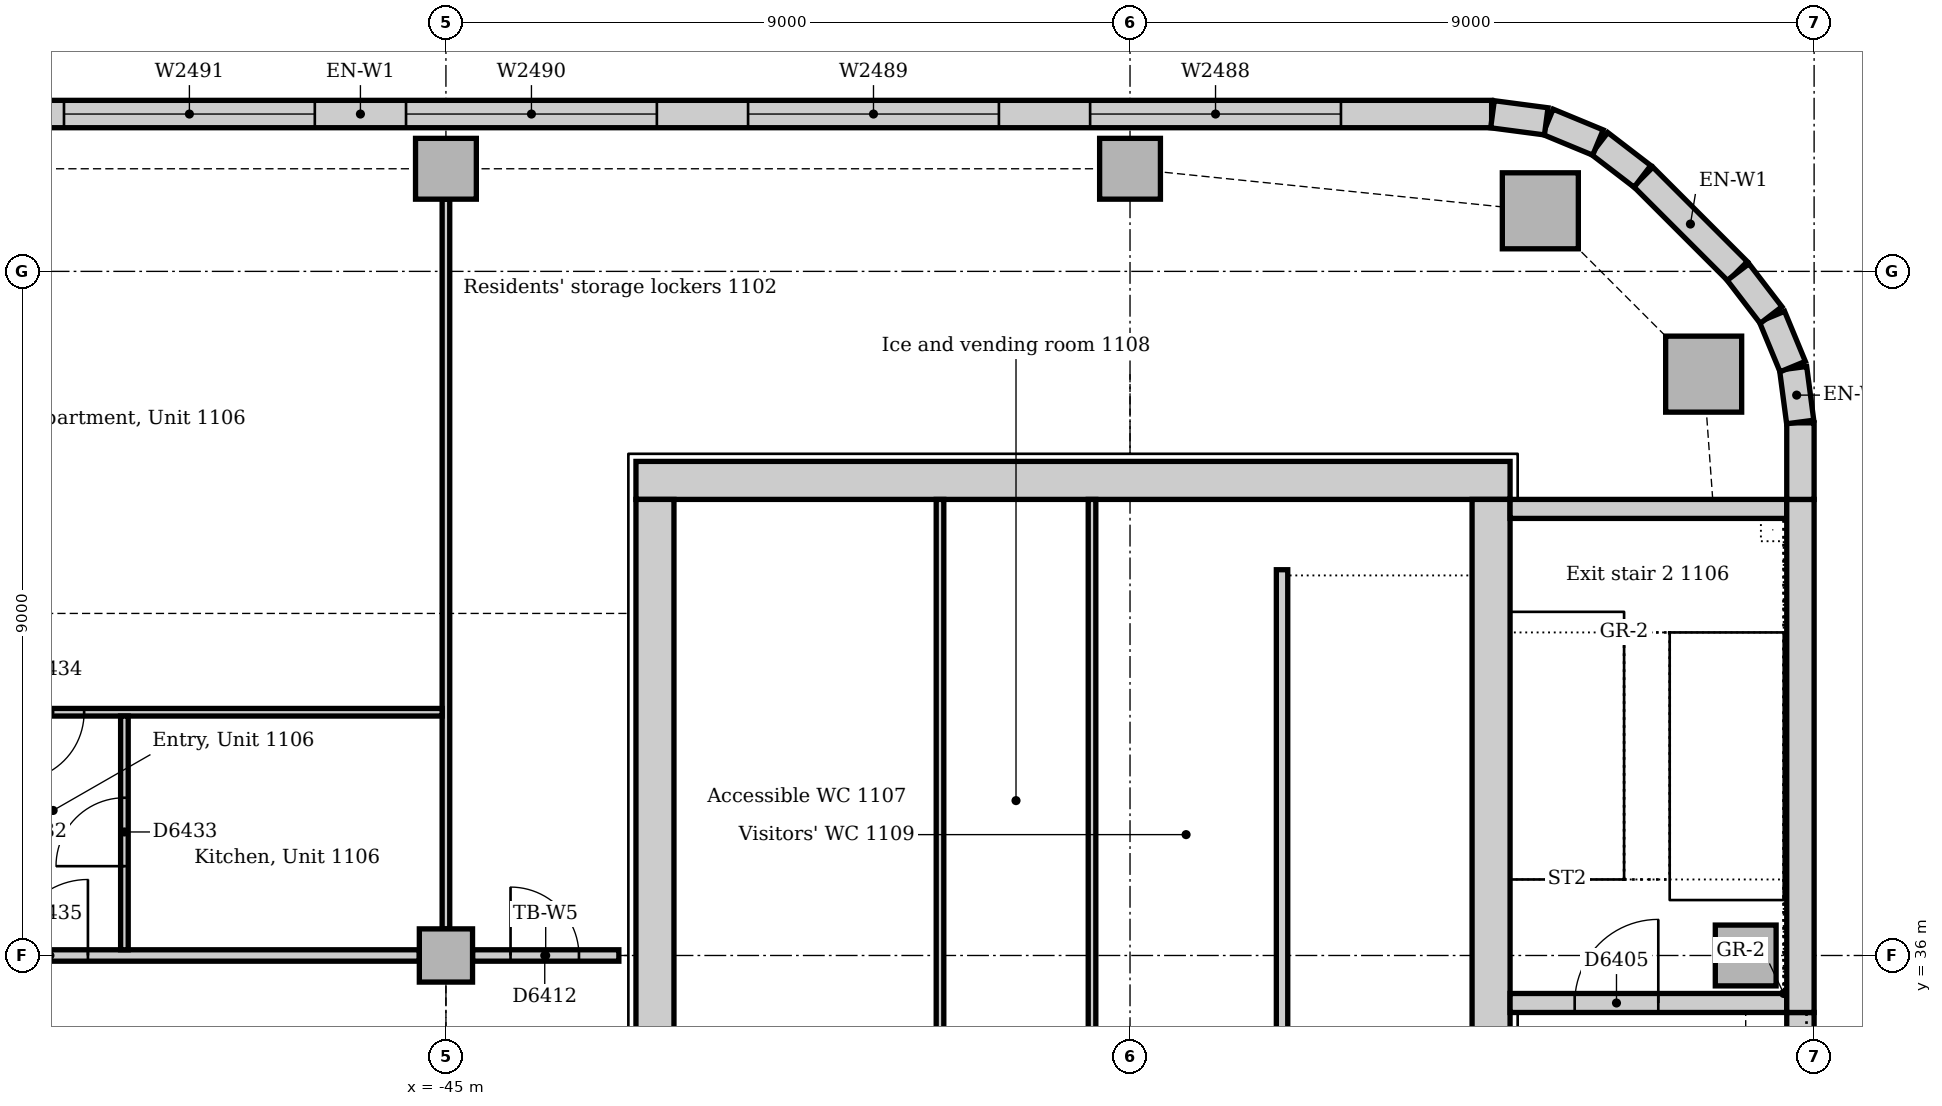
"""IFC4 building model, lengths in metres.
Left out: names, types, materials, properties, quantities, classifications, styles, units other than length and angle.
Written with IfcOpenShell. Run it as: python <this file> out.ifc"""

import sys

from ifc_helpers import new_model, si_unit, direction, frame, frame_2d, origin, origin_2d, place, context, subcontext, project, spatial, rectangle, extrude, element, fill, save


model = new_model("IFC4")
c1 = context("Model", 3, precision=1e-05, world=origin(), true_north=direction((0.0, 1.0)))
c2 = subcontext(c1, "Body", "Model", "MODEL_VIEW")
j1 = project(units=[si_unit("LENGTHUNIT", "METRE"), si_unit("PLANEANGLEUNIT", "RADIAN")], contexts=[c1])
p1 = place(None, origin())
s1 = spatial("IfcSite", under=j1, at=p1, CompositionType="ELEMENT")
p2 = place(p1, origin())
s2 = spatial("IfcBuilding", under=s1, at=p2, CompositionType="ELEMENT")
p3 = place(p2, frame((0.0, 0.0, 51.0)))
s3 = spatial("IfcBuildingStorey", under=s2, at=p3, CompositionType="ELEMENT", Elevation=51.0)
p4 = place(p3, frame((-31.0, 42.25, 0.0), z_axis=(0.0, 0.0, 1.0), x_axis=(-1.0, 0.0, 0.0)))
e1 = element("IfcWall", 1, at=p4, inside=s3, PredefinedType="SOLIDWALL", context=c2, shape_type="SweptSolid", body=[
    extrude(rectangle(XDim=11.5, YDim=0.5, at=frame_2d((5.75, 0.0))), origin(), (0.0, 0.0, 1.0), 4.0),
])
p5 = place(p3, frame((-31.25, 30.5, 0.0), z_axis=(0.0, 0.0, 1.0), x_axis=(0.0, 1.0, 0.0)))
e2 = element("IfcWall", 2, at=p5, inside=s3, PredefinedType="SOLIDWALL", context=c2, shape_type="SweptSolid", body=[
    extrude(rectangle(XDim=11.5, YDim=0.5, at=frame_2d((5.75, 0.0))), origin(), (0.0, 0.0, 1.0), 4.0),
])
p6 = place(p5, frame((0.85, 0.0, 0.0)))
e3 = element("IfcOpeningElement", 3, at=p6, cuts=e2, PredefinedType="OPENING", context=c2, shape_type="SweptSolid", body=[
    extrude(rectangle(XDim=1.8, YDim=2.1, at=frame_2d((0.9, 1.05))), frame((0.0, 0.26, 0.0), z_axis=(0.0, -1.0, 0.0), x_axis=(1.0, 0.0, 0.0)), (0.0, 0.0, 1.0), 0.52),
])
p7 = place(p3, frame((-42.25, 42.0, 0.0), z_axis=(0.0, 0.0, 1.0), x_axis=(0.0, -1.0, 0.0)))
e4 = element("IfcWall", 4, at=p7, inside=s3, PredefinedType="SOLIDWALL", context=c2, shape_type="SweptSolid", body=[
    extrude(rectangle(XDim=11.5, YDim=0.5, at=frame_2d((5.75, 0.0))), origin(), (0.0, 0.0, 1.0), 4.0),
])
p8 = place(p7, frame((8.85, 0.0, 0.0)))
e5 = element("IfcOpeningElement", 5, at=p8, cuts=e4, PredefinedType="OPENING", context=c2, shape_type="SweptSolid", body=[
    extrude(rectangle(XDim=1.8, YDim=2.1, at=frame_2d((0.9, 1.05))), frame((0.0, 0.26, 0.0), z_axis=(0.0, -1.0, 0.0), x_axis=(1.0, 0.0, 0.0)), (0.0, 0.0, 1.0), 0.52),
])
p9 = place(p3, frame((-31.0, 35.375, 0.0), z_axis=(0.0, 0.0, 1.0), x_axis=(1.0, 0.0, 0.0)))
e6 = element("IfcWall", 6, at=p9, inside=s3, PredefinedType="SOLIDWALL", context=c2, shape_type="SweptSolid", body=[
    extrude(rectangle(XDim=3.64, YDim=0.25, at=frame_2d((1.82, 0.0))), origin(), (0.0, 0.0, 1.0), 4.0),
])
p10 = place(p9, frame((0.85, 0.0, 0.0)))
e7 = element("IfcOpeningElement", 7, at=p10, cuts=e6, PredefinedType="OPENING", context=c2, shape_type="SweptSolid", body=[
    extrude(rectangle(XDim=1.1, YDim=2.1, at=frame_2d((0.55, 1.05))), frame((0.0, 0.135, 0.0), z_axis=(0.0, -1.0, 0.0), x_axis=(1.0, 0.0, 0.0)), (0.0, 0.0, 1.0), 0.27),
])
p11 = place(p3, frame((-27.36, 41.875, 0.0), z_axis=(0.0, 0.0, 1.0), x_axis=(-1.0, 0.0, 0.0)))
e8 = element("IfcWall", 8, at=p11, inside=s3, PredefinedType="SOLIDWALL", context=c2, shape_type="SweptSolid", body=[
    extrude(rectangle(XDim=3.64, YDim=0.25, at=frame_2d((1.82, 0.0))), origin(), (0.0, 0.0, 1.0), 4.0),
])
for number, where, z_axis, x_axis in (
    (9, (-28.453, 43.648, -0.15), (0.0, 0.0, 1.0), (1.0, 0.0, 0.0)),
    (10, (-30.602, 45.797, -0.15), (0.0, 0.0, 1.0), (1.0, 0.0, 0.0)),
):
    element("IfcColumn", number, at=place(p3, frame(where, z_axis=z_axis, x_axis=x_axis)), inside=s3, PredefinedType="COLUMN", context=c2, shape_type="SweptSolid", body=[
        extrude(rectangle(XDim=1.0, YDim=1.0, at=origin_2d()), origin(), (0.0, 0.0, 1.0), 4.0),
    ])
for number, where, z_axis, x_axis in (
    (11, (-27.9, 36.0, 0.0), (0.0, 0.0, 1.0), (1.0, 0.0, 0.0)),
    (12, (-45.0, 46.35, -0.15), (0.0, 0.0, 1.0), (1.0, 0.0, 0.0)),
    (13, (-36.0, 46.35, -0.15), (0.0, 0.0, 1.0), (1.0, 0.0, 0.0)),
):
    element("IfcColumn", number, at=place(p3, frame(where, z_axis=z_axis, x_axis=x_axis)), inside=s3, PredefinedType="COLUMN", context=c2, shape_type="SweptSolid", body=[
        extrude(rectangle(XDim=0.8, YDim=0.8, at=origin_2d()), origin(), (0.0, 0.0, 1.0), 4.0),
    ])
p12 = place(p3, frame((-45.0, 36.0, 0.0), z_axis=(0.0, 0.0, 1.0), x_axis=(1.0, 0.0, 0.0)))
e14 = element("IfcColumn", 14, at=p12, inside=s3, PredefinedType="COLUMN", context=c2, shape_type="SweptSolid", body=[
    extrude(rectangle(XDim=0.7, YDim=0.7, at=origin_2d()), origin(), (0.0, 0.0, 1.0), 3.85),
])
p13 = place(p3, frame((-27.18, 27.75, 0.0), z_axis=(0.0, 0.0, 1.0), x_axis=(0.0, 1.0, 0.0)))
e15 = element("IfcWall", 15, at=p13, inside=s3, PredefinedType="STANDARD", context=c2, shape_type="SweptSolid", body=[
    extrude(rectangle(XDim=7.5, YDim=0.36, at=frame_2d((3.75, 0.0))), origin(), (0.0, 0.0, 1.0), 3.85),
])
p14 = place(p13, frame((2.85, 0.0, 1.2)))
e16 = element("IfcOpeningElement", 16, at=p14, cuts=e15, PredefinedType="OPENING", context=c2, shape_type="SweptSolid", body=[
    extrude(rectangle(XDim=1.8, YDim=1.2, at=frame_2d((0.9, 0.6))), frame((0.0, 0.19, 0.0), z_axis=(0.0, -1.0, 0.0), x_axis=(1.0, 0.0, 0.0)), (0.0, 0.0, 1.0), 0.38),
])
p15 = place(p3, frame((-27.18, 35.25, 0.0), z_axis=(0.0, 0.0, 1.0), x_axis=(0.0, 1.0, 0.0)))
e17 = element("IfcWall", 17, at=p15, inside=s3, PredefinedType="STANDARD", context=c2, shape_type="SweptSolid", body=[
    extrude(rectangle(XDim=6.75, YDim=0.36, at=frame_2d((3.375, 0.0))), origin(), (0.0, 0.0, 1.0), 3.85),
])
p16 = place(p3, frame((-27.18, 42.0, 0.0), z_axis=(0.0, 0.0, 1.0), x_axis=(0.0, 1.0, 0.0)))
e18 = element("IfcWall", 18, at=p16, inside=s3, PredefinedType="STANDARD", context=c2, shape_type="SweptSolid", body=[
    extrude(rectangle(XDim=1.007, YDim=0.36, at=frame_2d((0.504, 0.0))), origin(), (0.0, 0.0, 1.0), 3.85),
])
p17 = place(p3, frame((-28.006, 45.001, 0.0), z_axis=(0.0, 0.0, 1.0), x_axis=(-0.707106781187, 0.707106781187, 0.0)))
e19 = element("IfcWall", 19, at=p17, inside=s3, PredefinedType="STANDARD", context=c2, shape_type="SweptSolid", body=[
    extrude(rectangle(XDim=1.757, YDim=0.36, at=frame_2d((0.879, 0.0))), origin(), (0.0, 0.0, 1.0), 3.85),
])
p18 = place(p3, frame((-31.243, 47.07, 0.0), z_axis=(0.0, 0.0, 1.0), x_axis=(-1.0, 0.0, 0.0)))
e20 = element("IfcWall", 20, at=p18, inside=s3, PredefinedType="STANDARD", context=c2, shape_type="SweptSolid", body=[
    extrude(rectangle(XDim=29.765, YDim=0.36, at=frame_2d((14.882, 0.0))), origin(), (0.0, 0.0, 1.0), 3.85),
])
p19 = place(p18, frame((1.982, 0.0, 0.9)))
e21 = element("IfcOpeningElement", 21, at=p19, cuts=e20, PredefinedType="OPENING", context=c2, shape_type="SweptSolid", body=[
    extrude(rectangle(XDim=3.3, YDim=1.6, at=frame_2d((1.65, 0.8))), frame((0.0, 0.19, 0.0), z_axis=(0.0, -1.0, 0.0), x_axis=(1.0, 0.0, 0.0)), (0.0, 0.0, 1.0), 0.38),
])
p20 = place(p18, frame((6.482, 0.0, 0.9)))
e22 = element("IfcOpeningElement", 22, at=p20, cuts=e20, PredefinedType="OPENING", context=c2, shape_type="SweptSolid", body=[
    extrude(rectangle(XDim=3.3, YDim=1.6, at=frame_2d((1.65, 0.8))), frame((0.0, 0.19, 0.0), z_axis=(0.0, -1.0, 0.0), x_axis=(1.0, 0.0, 0.0)), (0.0, 0.0, 1.0), 0.38),
])
p21 = place(p18, frame((10.982, 0.0, 0.9)))
e23 = element("IfcOpeningElement", 23, at=p21, cuts=e20, PredefinedType="OPENING", context=c2, shape_type="SweptSolid", body=[
    extrude(rectangle(XDim=3.3, YDim=1.6, at=frame_2d((1.65, 0.8))), frame((0.0, 0.19, 0.0), z_axis=(0.0, -1.0, 0.0), x_axis=(1.0, 0.0, 0.0)), (0.0, 0.0, 1.0), 0.38),
])
p22 = place(p18, frame((15.482, 0.0, 0.9)))
e24 = element("IfcOpeningElement", 24, at=p22, cuts=e20, PredefinedType="OPENING", context=c2, shape_type="SweptSolid", body=[
    extrude(rectangle(XDim=3.3, YDim=1.6, at=frame_2d((1.65, 0.8))), frame((0.0, 0.19, 0.0), z_axis=(0.0, -1.0, 0.0), x_axis=(1.0, 0.0, 0.0)), (0.0, 0.0, 1.0), 0.38),
])
p23 = place(p18, frame((19.982, 0.0, 0.9)))
e25 = element("IfcOpeningElement", 25, at=p23, cuts=e20, PredefinedType="OPENING", context=c2, shape_type="SweptSolid", body=[
    extrude(rectangle(XDim=3.3, YDim=1.6, at=frame_2d((1.65, 0.8))), frame((0.0, 0.19, 0.0), z_axis=(0.0, -1.0, 0.0), x_axis=(1.0, 0.0, 0.0)), (0.0, 0.0, 1.0), 0.38),
])
p24 = place(p18, frame((24.482, 0.0, 0.9)))
e26 = element("IfcOpeningElement", 26, at=p24, cuts=e20, PredefinedType="OPENING", context=c2, shape_type="SweptSolid", body=[
    extrude(rectangle(XDim=3.3, YDim=1.6, at=frame_2d((1.65, 0.8))), frame((0.0, 0.19, 0.0), z_axis=(0.0, -1.0, 0.0), x_axis=(1.0, 0.0, 0.0)), (0.0, 0.0, 1.0), 0.38),
])
for number, where, z_axis, x_axis in (
    (27, (-27.183, 43.019, 0.0), (0.0, 0.0, 1.0), (-0.131, 0.991, 0.0)),
    (28, (-27.282, 43.747, 0.0), (0.0, 0.0, 1.0), (-0.383, 0.924, 0.0)),
):
    element("IfcWall", number, at=place(p3, frame(where, z_axis=z_axis, x_axis=x_axis)), inside=s3, PredefinedType="STANDARD", context=c2, shape_type="SweptSolid", body=[
        extrude(rectangle(XDim=0.713, YDim=0.36, at=frame_2d((0.356, 0.0))), origin(), (0.0, 0.0, 1.0), 3.85),
    ])
for number, where, z_axis, x_axis in (
    (29, (-27.566, 44.425, 0.0), (0.0, 0.0, 1.0), (-0.609, 0.793, 0.0)),
    (30, (-29.259, 46.25, 0.0), (0.0, 0.0, 1.0), (-0.793, 0.609, 0.0)),
):
    element("IfcWall", number, at=place(p3, frame(where, z_axis=z_axis, x_axis=x_axis)), inside=s3, PredefinedType="STANDARD", context=c2, shape_type="SweptSolid", body=[
        extrude(rectangle(XDim=0.713, YDim=0.36, at=frame_2d((0.357, 0.0))), origin(), (0.0, 0.0, 1.0), 3.85),
    ])
for number, where, z_axis, x_axis in (
    (31, (-29.844, 46.695, 0.0), (0.0, 0.0, 1.0), (-0.924, 0.383, 0.0)),
    (32, (-30.524, 46.974, 0.0), (0.0, 0.0, 1.0), (-0.991, 0.131, 0.0)),
):
    element("IfcWall", number, at=place(p3, frame(where, z_axis=z_axis, x_axis=x_axis)), inside=s3, PredefinedType="STANDARD", context=c2, shape_type="SweptSolid", body=[
        extrude(rectangle(XDim=0.713, YDim=0.36, at=frame_2d((0.356, 0.0))), origin(), (0.0, 0.0, 1.0), 3.85),
    ])
p25 = place(p3, frame((-34.0, 41.075, 0.0), z_axis=(0.0, 0.0, 1.0), x_axis=(0.0, -1.0, 0.0)))
e33 = element("IfcWall", 33, at=p25, inside=s3, PredefinedType="SOLIDWALL", context=c2, shape_type="SweptSolid", body=[
    extrude(rectangle(XDim=7.0, YDim=0.15, at=frame_2d((3.5, 0.0))), origin(), (0.0, 0.0, 1.0), 4.0),
])
for number, where, z_axis, x_axis in (
    (34, (-38.5, 34.075, 0.0), (0.0, 0.0, 1.0), (0.0, 1.0, 0.0)),
    (35, (-36.5, 34.075, 0.0), (0.0, 0.0, 1.0), (0.0, 1.0, 0.0)),
):
    element("IfcWall", number, at=place(p3, frame(where, z_axis=z_axis, x_axis=x_axis)), inside=s3, PredefinedType="PARTITIONING", context=c2, shape_type="SweptSolid", body=[
        extrude(rectangle(XDim=7.925, YDim=0.1, at=frame_2d((3.962, 0.0))), origin(), (0.0, 0.0, 1.0), 3.85),
    ])
p26 = place(p3, frame((-44.65, 36.0, 0.0), z_axis=(0.0, 0.0, 1.0), x_axis=(1.0, 0.0, 0.0)))
e36 = element("IfcWall", 36, at=p26, inside=s3, PredefinedType="PARTITIONING", context=c2, shape_type="SweptSolid", body=[
    extrude(rectangle(XDim=1.925, YDim=0.15, at=frame_2d((0.963, 0.0))), origin(), (0.0, 0.0, 1.0), 3.602),
])
p27 = place(p26, frame((0.5, 0.0, 0.0)))
e37 = element("IfcOpeningElement", 37, at=p27, cuts=e36, PredefinedType="OPENING", context=c2, shape_type="SweptSolid", body=[
    extrude(rectangle(XDim=0.9, YDim=2.1, at=frame_2d((0.45, 1.05))), frame((0.0, 0.085, 0.0), z_axis=(0.0, -1.0, 0.0), x_axis=(1.0, 0.0, 0.0)), (0.0, 0.0, 1.0), 0.17),
])
p28 = place(p3, frame((-53.65, 36.0, 0.0), z_axis=(0.0, 0.0, 1.0), x_axis=(1.0, 0.0, 0.0)))
e38 = element("IfcWall", 38, at=p28, inside=s3, PredefinedType="PARTITIONING", context=c2, shape_type="SweptSolid", body=[
    extrude(rectangle(XDim=8.3, YDim=0.15, at=frame_2d((4.15, 0.0))), origin(), (0.0, 0.0, 1.0), 3.158),
])
p29 = place(p28, frame((2.94, 0.0, 0.0)))
e39 = element("IfcOpeningElement", 39, at=p29, cuts=e38, PredefinedType="OPENING", context=c2, shape_type="SweptSolid", body=[
    extrude(rectangle(XDim=1.0, YDim=2.1, at=frame_2d((0.5, 1.05))), frame((0.0, 0.085, 0.0), z_axis=(0.0, -1.0, 0.0), x_axis=(1.0, 0.0, 0.0)), (0.0, 0.0, 1.0), 0.17),
])
p30 = place(p3, frame((-45.0, 36.35, 0.0), z_axis=(0.0, 0.0, 1.0), x_axis=(0.0, 1.0, 0.0)))
e40 = element("IfcWall", 40, at=p30, inside=s3, PredefinedType="PARTITIONING", context=c2, shape_type="SweptSolid", body=[
    extrude(rectangle(XDim=9.6, YDim=0.1, at=frame_2d((4.8, 0.0))), origin(), (0.0, 0.0, 1.0), 3.256),
])
p31 = place(p3, frame((-53.95, 39.2, 0.0), z_axis=(0.0, 0.0, 1.0), x_axis=(1.0, 0.0, 0.0)))
e41 = element("IfcWall", 41, at=p31, inside=s3, PredefinedType="PARTITIONING", context=c2, shape_type="SweptSolid", body=[
    extrude(rectangle(XDim=8.9, YDim=0.1, at=frame_2d((4.45, 0.0))), origin(), (0.0, 0.0, 1.0), 3.85),
])
p32 = place(p31, frame((3.29, 0.0, 0.0)))
e42 = element("IfcOpeningElement", 42, at=p32, cuts=e41, PredefinedType="OPENING", context=c2, shape_type="SweptSolid", body=[
    extrude(rectangle(XDim=0.9, YDim=2.1, at=frame_2d((0.45, 1.05))), frame((0.0, 0.06, 0.0), z_axis=(0.0, -1.0, 0.0), x_axis=(1.0, 0.0, 0.0)), (0.0, 0.0, 1.0), 0.12),
])
p33 = place(p3, frame((-49.23, 36.075, 0.0), z_axis=(0.0, 0.0, 1.0), x_axis=(0.0, 1.0, 0.0)))
e43 = element("IfcWall", 43, at=p33, inside=s3, PredefinedType="PARTITIONING", context=c2, shape_type="SweptSolid", body=[
    extrude(rectangle(XDim=3.075, YDim=0.1, at=frame_2d((1.538, 0.0))), origin(), (0.0, 0.0, 1.0), 3.85),
])
p34 = place(p33, frame((1.1, 0.0, 0.0)))
e44 = element("IfcOpeningElement", 44, at=p34, cuts=e43, PredefinedType="OPENING", context=c2, shape_type="SweptSolid", body=[
    extrude(rectangle(XDim=0.9, YDim=2.1, at=frame_2d((0.45, 1.05))), frame((0.0, 0.06, 0.0), z_axis=(0.0, -1.0, 0.0), x_axis=(1.0, 0.0, 0.0)), (0.0, 0.0, 1.0), 0.12),
])
p35 = place(p19, origin())
e45 = element("IfcWindow", 45, at=p35, inside=s3, PartitioningType="SINGLE_PANEL", PredefinedType="WINDOW", context=c2, shape_type="SweptSolid", body=[
    extrude(rectangle(XDim=3.3, YDim=1.6, at=frame_2d((1.65, 0.8))), frame((0.0, 0.13, 0.0), z_axis=(0.0, -1.0, 0.0), x_axis=(1.0, 0.0, 0.0)), (0.0, 0.0, 1.0), 0.06),
])
fill(e21, e45)
p36 = place(p20, origin())
e46 = element("IfcWindow", 46, at=p36, inside=s3, PartitioningType="SINGLE_PANEL", PredefinedType="WINDOW", context=c2, shape_type="SweptSolid", body=[
    extrude(rectangle(XDim=3.3, YDim=1.6, at=frame_2d((1.65, 0.8))), frame((0.0, 0.13, 0.0), z_axis=(0.0, -1.0, 0.0), x_axis=(1.0, 0.0, 0.0)), (0.0, 0.0, 1.0), 0.06),
])
fill(e22, e46)
p37 = place(p21, origin())
e47 = element("IfcWindow", 47, at=p37, inside=s3, PartitioningType="SINGLE_PANEL", PredefinedType="WINDOW", context=c2, shape_type="SweptSolid", body=[
    extrude(rectangle(XDim=3.3, YDim=1.6, at=frame_2d((1.65, 0.8))), frame((0.0, 0.13, 0.0), z_axis=(0.0, -1.0, 0.0), x_axis=(1.0, 0.0, 0.0)), (0.0, 0.0, 1.0), 0.06),
])
fill(e23, e47)
p38 = place(p22, origin())
e48 = element("IfcWindow", 48, at=p38, inside=s3, PartitioningType="SINGLE_PANEL", PredefinedType="WINDOW", context=c2, shape_type="SweptSolid", body=[
    extrude(rectangle(XDim=3.3, YDim=1.6, at=frame_2d((1.65, 0.8))), frame((0.0, 0.13, 0.0), z_axis=(0.0, -1.0, 0.0), x_axis=(1.0, 0.0, 0.0)), (0.0, 0.0, 1.0), 0.06),
])
fill(e24, e48)
p39 = place(p10, origin())
e49 = element("IfcDoor", 49, at=p39, inside=s3, OperationType="SINGLE_SWING_RIGHT", PredefinedType="DOOR", context=c2, shape_type="SweptSolid", body=[
    extrude(rectangle(XDim=1.1, YDim=2.1, at=frame_2d((0.55, 1.05))), frame((0.0, 0.025, 0.0), z_axis=(0.0, -1.0, 0.0), x_axis=(1.0, 0.0, 0.0)), (0.0, 0.0, 1.0), 0.05),
])
fill(e7, e49)
p40 = place(p27, origin())
e50 = element("IfcDoor", 50, at=p40, inside=s3, OperationType="SINGLE_SWING_LEFT", PredefinedType="DOOR", context=c2, shape_type="SweptSolid", body=[
    extrude(rectangle(XDim=0.9, YDim=2.1, at=frame_2d((0.45, 1.05))), frame((0.0, 0.025, 0.0), z_axis=(0.0, -1.0, 0.0), x_axis=(1.0, 0.0, 0.0)), (0.0, 0.0, 1.0), 0.05),
])
fill(e37, e50)
p41 = place(p34, origin())
e51 = element("IfcDoor", 51, at=p41, inside=s3, OperationType="SINGLE_SWING_LEFT", PredefinedType="DOOR", context=c2, shape_type="SweptSolid", body=[
    extrude(rectangle(XDim=0.9, YDim=2.1, at=frame_2d((0.45, 1.05))), frame((0.0, 0.025, 0.0), z_axis=(0.0, -1.0, 0.0), x_axis=(1.0, 0.0, 0.0)), (0.0, 0.0, 1.0), 0.05),
])
fill(e44, e51)
p42 = place(p32, frame((0.9, 0.0, 0.0), z_axis=(0.0, 0.0, 1.0), x_axis=(-1.0, 0.0, 0.0)))
e52 = element("IfcDoor", 52, at=p42, inside=s3, OperationType="SINGLE_SWING_RIGHT", PredefinedType="DOOR", context=c2, shape_type="SweptSolid", body=[
    extrude(rectangle(XDim=0.9, YDim=2.1, at=frame_2d((0.45, 1.05))), frame((0.0, 0.025, 0.0), z_axis=(0.0, -1.0, 0.0), x_axis=(1.0, 0.0, 0.0)), (0.0, 0.0, 1.0), 0.05),
])
fill(e42, e52)
p43 = place(p29, origin())
e53 = element("IfcDoor", 53, at=p43, inside=s3, OperationType="SINGLE_SWING_RIGHT", PredefinedType="DOOR", context=c2, shape_type="SweptSolid", body=[
    extrude(rectangle(XDim=1.0, YDim=2.1, at=frame_2d((0.5, 1.05))), frame((0.0, 0.025, 0.0), z_axis=(0.0, -1.0, 0.0), x_axis=(1.0, 0.0, 0.0)), (0.0, 0.0, 1.0), 0.05),
])
fill(e39, e53)
save(model, sys.argv[1])
